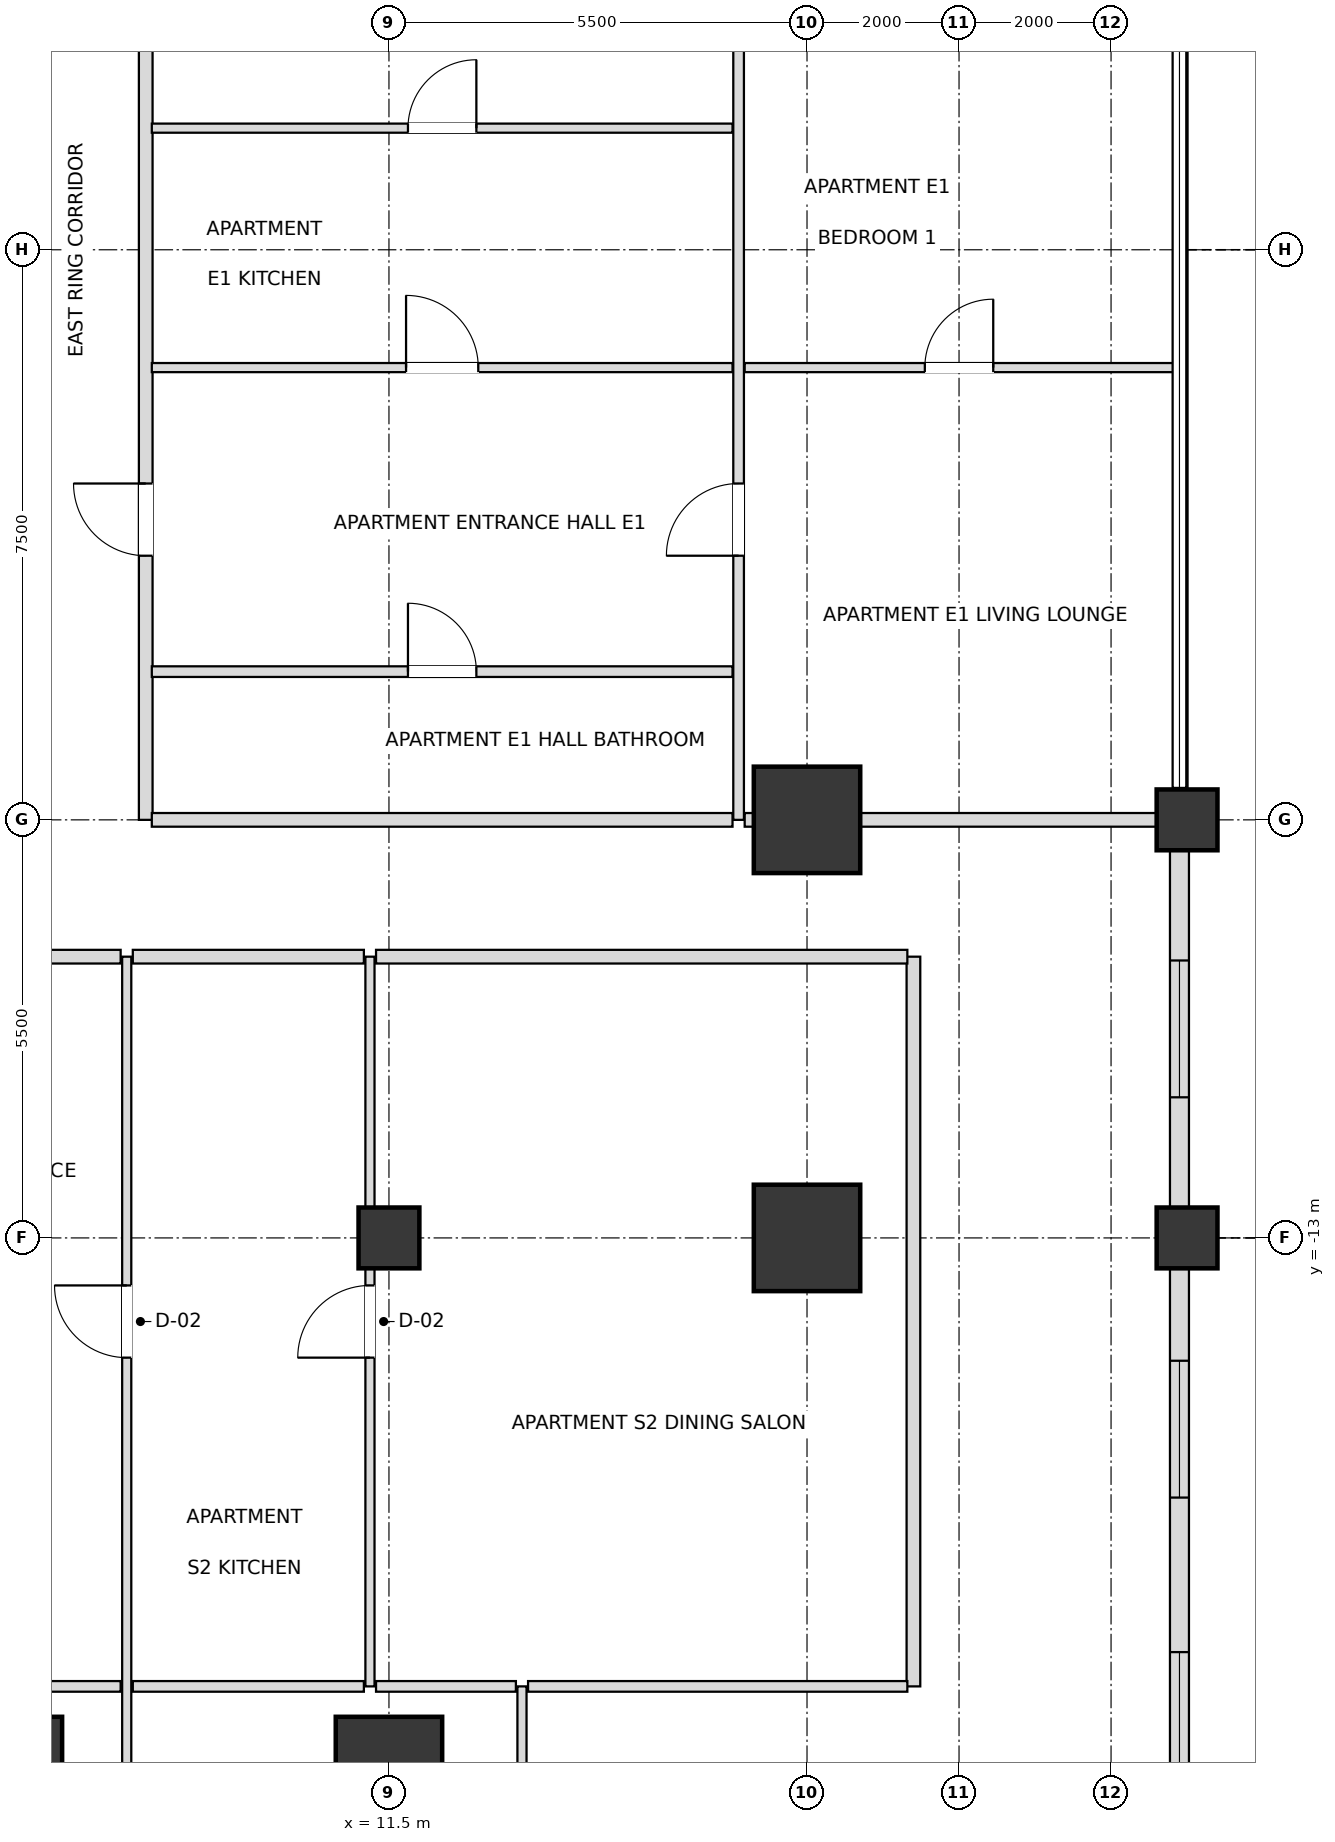
"""IFC4 building model, lengths in metres.
Left out: names, types, materials, properties, quantities, classifications, styles, units other than length and angle.
Written with IfcOpenShell. Run it as: python <this file> out.ifc"""

import sys

from ifc_helpers import new_model, si_unit, direction, frame, frame_2d, origin, origin_2d, place, context, subcontext, project, spatial, rectangle, extrude, element, fill, save


model = new_model("IFC4")
c1 = context("Model", 3, precision=1e-05, world=origin(), true_north=direction((0.0, 1.0)))
c2 = subcontext(c1, "Body", "Model", "MODEL_VIEW")
j1 = project(units=[si_unit("LENGTHUNIT", "METRE"), si_unit("PLANEANGLEUNIT", "RADIAN")], contexts=[c1])
p1 = place(None, origin())
s1 = spatial("IfcSite", under=j1, at=p1, CompositionType="ELEMENT")
p2 = place(p1, origin())
s2 = spatial("IfcBuilding", under=s1, at=p2, CompositionType="ELEMENT")
p3 = place(p2, frame((0.0, 0.0, 50.4)))
s3 = spatial("IfcBuildingStorey", under=s2, at=p3, CompositionType="ELEMENT", Elevation=50.4)
for number, where, z_axis, x_axis in (
    (1, (6.5, -20.0, 0.0), (0.0, 0.0, 1.0), (1.0, 0.0, 0.0)),
    (2, (11.5, -20.0, 0.0), (0.0, 0.0, 1.0), (1.0, 0.0, 0.0)),
    (3, (17.0, -13.0, 0.0), (0.0, 0.0, 1.0), (1.0, 0.0, 0.0)),
    (4, (17.0, -7.5, 0.0), (0.0, 0.0, 1.0), (1.0, 0.0, 0.0)),
):
    element("IfcColumn", number, at=place(p3, frame(where, z_axis=z_axis, x_axis=x_axis)), inside=s3, PredefinedType="USERDEFINED", context=c2, shape_type="SweptSolid", body=[
        extrude(rectangle(XDim=1.4, YDim=1.4, at=origin_2d()), origin(), (0.0, 0.0, 1.0), 3.6),
    ])
for number, where, z_axis, x_axis in (
    (5, (11.5, -13.0, 0.0), (0.0, 0.0, 1.0), (1.0, 0.0, 0.0)),
    (6, (22.0, -13.0, 0.0), (0.0, 0.0, 1.0), (1.0, 0.0, 0.0)),
    (7, (22.0, -7.5, 0.0), (0.0, 0.0, 1.0), (1.0, 0.0, 0.0)),
):
    element("IfcColumn", number, at=place(p3, frame(where, z_axis=z_axis, x_axis=x_axis)), inside=s3, PredefinedType="COLUMN", context=c2, shape_type="SweptSolid", body=[
        extrude(rectangle(XDim=0.8, YDim=0.8, at=origin_2d()), origin(), (0.0, 0.0, 1.0), 3.6),
    ])
p4 = place(p3, frame((21.9, -21.425, 0.0), z_axis=(0.0, 0.0, 1.0), x_axis=(0.0, 1.0, 0.0)))
e8 = element("IfcWall", 8, at=p4, inside=s3, PredefinedType="SOLIDWALL", context=c2, shape_type="SweptSolid", body=[
    extrude(rectangle(XDim=8.03, YDim=0.25, at=frame_2d((4.015, 0.0))), origin(), (0.0, 0.0, 1.0), 2.736),
])
p5 = place(p4, frame((1.176, 0.0, 0.72)))
e9 = element("IfcOpeningElement", 9, at=p5, cuts=e8, PredefinedType="OPENING", context=c2, shape_type="SweptSolid", body=[
    extrude(rectangle(XDim=1.8, YDim=1.68, at=frame_2d((0.9, 0.84))), frame((0.0, 0.135, 0.0), z_axis=(0.0, -1.0, 0.0), x_axis=(1.0, 0.0, 0.0)), (0.0, 0.0, 1.0), 0.27),
])
p6 = place(p4, frame((5.009, 0.0, 0.72)))
e10 = element("IfcOpeningElement", 10, at=p6, cuts=e8, PredefinedType="OPENING", context=c2, shape_type="SweptSolid", body=[
    extrude(rectangle(XDim=1.8, YDim=1.68, at=frame_2d((0.9, 0.84))), frame((0.0, 0.135, 0.0), z_axis=(0.0, -1.0, 0.0), x_axis=(1.0, 0.0, 0.0)), (0.0, 0.0, 1.0), 0.27),
])
p7 = place(p3, frame((21.9, -12.605, 0.0), z_axis=(0.0, 0.0, 1.0), x_axis=(0.0, 1.0, 0.0)))
e11 = element("IfcWall", 11, at=p7, inside=s3, PredefinedType="SOLIDWALL", context=c2, shape_type="SweptSolid", body=[
    extrude(rectangle(XDim=4.71, YDim=0.25, at=frame_2d((2.355, 0.0))), origin(), (0.0, 0.0, 1.0), 2.736),
])
p8 = place(p7, frame((1.455, 0.0, 0.72)))
e12 = element("IfcOpeningElement", 12, at=p8, cuts=e11, PredefinedType="OPENING", context=c2, shape_type="SweptSolid", body=[
    extrude(rectangle(XDim=1.8, YDim=1.68, at=frame_2d((0.9, 0.84))), frame((0.0, 0.135, 0.0), z_axis=(0.0, -1.0, 0.0), x_axis=(1.0, 0.0, 0.0)), (0.0, 0.0, 1.0), 0.27),
])
p9 = place(p3, frame((8.05, -24.9, 0.0), z_axis=(0.0, 0.0, 1.0), x_axis=(0.0, 1.0, 0.0)))
e13 = element("IfcWall", 13, at=p9, inside=s3, PredefinedType="PARTITIONING", context=c2, shape_type="SweptSolid", body=[
    extrude(rectangle(XDim=15.6, YDim=0.12, at=frame_2d((7.8, 0.0))), origin(), (0.0, 0.0, 1.0), 2.816),
])
p10 = place(p9, frame((10.325, 0.0, 0.0)))
e14 = element("IfcOpeningElement", 14, at=p10, cuts=e13, PredefinedType="OPENING", context=c2, shape_type="SweptSolid", body=[
    extrude(rectangle(XDim=0.95, YDim=2.1, at=frame_2d((0.475, 1.05))), frame((0.0, 0.07, 0.0), z_axis=(0.0, -1.0, 0.0), x_axis=(1.0, 0.0, 0.0)), (0.0, 0.0, 1.0), 0.14),
])
p11 = place(p9, frame((2.55, 0.0, 0.0)))
e15 = element("IfcOpeningElement", 15, at=p11, cuts=e13, PredefinedType="OPENING", context=c2, shape_type="SweptSolid", body=[
    extrude(rectangle(XDim=0.9, YDim=2.1, at=frame_2d((0.45, 1.05))), frame((0.0, 0.07, 0.0), z_axis=(0.0, -1.0, 0.0), x_axis=(1.0, 0.0, 0.0)), (0.0, 0.0, 1.0), 0.14),
])
p12 = place(p3, frame((8.3, -7.5, 0.0), z_axis=(0.0, 0.0, 1.0), x_axis=(0.0, 1.0, 0.0)))
e16 = element("IfcWall", 16, at=p12, inside=s3, PredefinedType="PARTITIONING", context=c2, shape_type="SweptSolid", body=[
    extrude(rectangle(XDim=15.0, YDim=0.18, at=frame_2d((7.5, 0.0))), origin(), (0.0, 0.0, 1.0), 3.38),
])
p13 = place(p12, frame((3.475, 0.0, 0.0)))
e17 = element("IfcOpeningElement", 17, at=p13, cuts=e16, PredefinedType="OPENING", context=c2, shape_type="SweptSolid", body=[
    extrude(rectangle(XDim=0.95, YDim=2.15, at=frame_2d((0.475, 1.075))), frame((0.0, 0.1, 0.0), z_axis=(0.0, -1.0, 0.0), x_axis=(1.0, 0.0, 0.0)), (0.0, 0.0, 1.0), 0.2),
])
p14 = place(p3, frame((11.25, -18.9, 0.0), z_axis=(0.0, 0.0, 1.0), x_axis=(0.0, 1.0, 0.0)))
e18 = element("IfcWall", 18, at=p14, inside=s3, PredefinedType="PARTITIONING", context=c2, shape_type="SweptSolid", body=[
    extrude(rectangle(XDim=9.6, YDim=0.12, at=frame_2d((4.8, 0.0))), origin(), (0.0, 0.0, 1.0), 2.736),
])
p15 = place(p14, frame((4.325, 0.0, 0.0)))
e19 = element("IfcOpeningElement", 19, at=p15, cuts=e18, PredefinedType="OPENING", context=c2, shape_type="SweptSolid", body=[
    extrude(rectangle(XDim=0.95, YDim=2.1, at=frame_2d((0.475, 1.05))), frame((0.0, 0.07, 0.0), z_axis=(0.0, -1.0, 0.0), x_axis=(1.0, 0.0, 0.0)), (0.0, 0.0, 1.0), 0.14),
])
p16 = place(p3, frame((13.25, -24.9, 0.0), z_axis=(0.0, 0.0, 1.0), x_axis=(0.0, 1.0, 0.0)))
e20 = element("IfcWall", 20, at=p16, inside=s3, PredefinedType="PARTITIONING", context=c2, shape_type="SweptSolid", body=[
    extrude(rectangle(XDim=6.0, YDim=0.12, at=frame_2d((3.0, 0.0))), origin(), (0.0, 0.0, 1.0), 2.736),
])
p17 = place(p16, frame((2.55, 0.0, 0.0)))
e21 = element("IfcOpeningElement", 21, at=p17, cuts=e20, PredefinedType="OPENING", context=c2, shape_type="SweptSolid", body=[
    extrude(rectangle(XDim=0.9, YDim=2.1, at=frame_2d((0.45, 1.05))), frame((0.0, 0.07, 0.0), z_axis=(0.0, -1.0, 0.0), x_axis=(1.0, 0.0, 0.0)), (0.0, 0.0, 1.0), 0.14),
])
p18 = place(p3, frame((16.1, -7.5, 0.0), z_axis=(0.0, 0.0, 1.0), x_axis=(0.0, 1.0, 0.0)))
e22 = element("IfcWall", 22, at=p18, inside=s3, PredefinedType="PARTITIONING", context=c2, shape_type="SweptSolid", body=[
    extrude(rectangle(XDim=15.0, YDim=0.14, at=frame_2d((7.5, 0.0))), origin(), (0.0, 0.0, 1.0), 3.38),
])
p19 = place(p18, frame((3.475, 0.0, 0.0)))
e23 = element("IfcOpeningElement", 23, at=p19, cuts=e22, PredefinedType="OPENING", context=c2, shape_type="SweptSolid", body=[
    extrude(rectangle(XDim=0.95, YDim=2.1, at=frame_2d((0.475, 1.05))), frame((0.0, 0.08, 0.0), z_axis=(0.0, -1.0, 0.0), x_axis=(1.0, 0.0, 0.0)), (0.0, 0.0, 1.0), 0.16),
])
p20 = place(p3, frame((18.4, -18.9, 0.0), z_axis=(0.0, 0.0, 1.0), x_axis=(0.0, 1.0, 0.0)))
e24 = element("IfcWall", 24, at=p20, inside=s3, PredefinedType="PARTITIONING", context=c2, shape_type="SweptSolid", body=[
    extrude(rectangle(XDim=9.6, YDim=0.18, at=frame_2d((4.8, 0.0))), origin(), (0.0, 0.0, 1.0), 2.736),
])
p21 = place(p3, frame((3.93, -18.9, 0.0), z_axis=(0.0, 0.0, 1.0), x_axis=(1.0, 0.0, 0.0)))
e25 = element("IfcWall", 25, at=p21, inside=s3, PredefinedType="PARTITIONING", context=c2, shape_type="SweptSolid", body=[
    extrude(rectangle(XDim=4.04, YDim=0.14, at=frame_2d((2.02, 0.0))), origin(), (0.0, 0.0, 1.0), 2.816),
])
p22 = place(p21, frame((0.638, 0.0, 0.0)))
e26 = element("IfcOpeningElement", 26, at=p22, cuts=e25, PredefinedType="OPENING", context=c2, shape_type="SweptSolid", body=[
    extrude(rectangle(XDim=0.95, YDim=2.1, at=frame_2d((0.475, 1.05))), frame((0.0, 0.08, 0.0), z_axis=(0.0, -1.0, 0.0), x_axis=(1.0, 0.0, 0.0)), (0.0, 0.0, 1.0), 0.16),
])
p23 = place(p3, frame((8.13, -18.9, 0.0), z_axis=(0.0, 0.0, 1.0), x_axis=(1.0, 0.0, 0.0)))
e27 = element("IfcWall", 27, at=p23, inside=s3, PredefinedType="PARTITIONING", context=c2, shape_type="SweptSolid", body=[
    extrude(rectangle(XDim=3.04, YDim=0.14, at=frame_2d((1.52, 0.0))), origin(), (0.0, 0.0, 1.0), 3.38),
])
p24 = place(p3, frame((11.33, -18.9, 0.0), z_axis=(0.0, 0.0, 1.0), x_axis=(1.0, 0.0, 0.0)))
e28 = element("IfcWall", 28, at=p24, inside=s3, PredefinedType="PARTITIONING", context=c2, shape_type="SweptSolid", body=[
    extrude(rectangle(XDim=1.84, YDim=0.14, at=frame_2d((0.92, 0.0))), origin(), (0.0, 0.0, 1.0), 2.736),
])
p25 = place(p3, frame((13.33, -18.9, 0.0), z_axis=(0.0, 0.0, 1.0), x_axis=(1.0, 0.0, 0.0)))
e29 = element("IfcWall", 29, at=p25, inside=s3, PredefinedType="PARTITIONING", context=c2, shape_type="SweptSolid", body=[
    extrude(rectangle(XDim=4.99, YDim=0.14, at=frame_2d((2.495, 0.0))), origin(), (0.0, 0.0, 1.0), 2.736),
])
p26 = place(p3, frame((3.93, -9.3, 0.0), z_axis=(0.0, 0.0, 1.0), x_axis=(1.0, 0.0, 0.0)))
e30 = element("IfcWall", 30, at=p26, inside=s3, PredefinedType="PARTITIONING", context=c2, shape_type="SweptSolid", body=[
    extrude(rectangle(XDim=4.04, YDim=0.18, at=frame_2d((2.02, 0.0))), origin(), (0.0, 0.0, 1.0), 2.816),
])
p27 = place(p26, frame((1.565, 0.0, 0.0)))
e31 = element("IfcOpeningElement", 31, at=p27, cuts=e30, PredefinedType="OPENING", context=c2, shape_type="SweptSolid", body=[
    extrude(rectangle(XDim=0.95, YDim=2.15, at=frame_2d((0.475, 1.075))), frame((0.0, 0.1, 0.0), z_axis=(0.0, -1.0, 0.0), x_axis=(1.0, 0.0, 0.0)), (0.0, 0.0, 1.0), 0.2),
])
p28 = place(p3, frame((8.13, -9.3, 0.0), z_axis=(0.0, 0.0, 1.0), x_axis=(1.0, 0.0, 0.0)))
e32 = element("IfcWall", 32, at=p28, inside=s3, PredefinedType="PARTITIONING", context=c2, shape_type="SweptSolid", body=[
    extrude(rectangle(XDim=3.04, YDim=0.18, at=frame_2d((1.52, 0.0))), origin(), (0.0, 0.0, 1.0), 3.38),
])
p29 = place(p3, frame((11.33, -9.3, 0.0), z_axis=(0.0, 0.0, 1.0), x_axis=(1.0, 0.0, 0.0)))
e33 = element("IfcWall", 33, at=p29, inside=s3, PredefinedType="PARTITIONING", context=c2, shape_type="SweptSolid", body=[
    extrude(rectangle(XDim=6.99, YDim=0.18, at=frame_2d((3.495, 0.0))), origin(), (0.0, 0.0, 1.0), 2.816),
])
p30 = place(p3, frame((8.38, -7.5, 0.0), z_axis=(0.0, 0.0, 1.0), x_axis=(1.0, 0.0, 0.0)))
e34 = element("IfcWall", 34, at=p30, inside=s3, PredefinedType="PARTITIONING", context=c2, shape_type="SweptSolid", body=[
    extrude(rectangle(XDim=7.64, YDim=0.18, at=frame_2d((3.82, 0.0))), origin(), (0.0, 0.0, 1.0), 2.816),
])
p31 = place(p3, frame((16.18, -7.5, 0.0), z_axis=(0.0, 0.0, 1.0), x_axis=(1.0, 0.0, 0.0)))
e35 = element("IfcWall", 35, at=p31, inside=s3, PredefinedType="PARTITIONING", context=c2, shape_type="SweptSolid", body=[
    extrude(rectangle(XDim=5.72, YDim=0.18, at=frame_2d((2.86, 0.0))), origin(), (0.0, 0.0, 1.0), 2.816),
])
p32 = place(p3, frame((8.38, -5.55, 0.0), z_axis=(0.0, 0.0, 1.0), x_axis=(1.0, 0.0, 0.0)))
e36 = element("IfcWall", 36, at=p32, inside=s3, PredefinedType="PARTITIONING", context=c2, shape_type="SweptSolid", body=[
    extrude(rectangle(XDim=7.64, YDim=0.14, at=frame_2d((3.82, 0.0))), origin(), (0.0, 0.0, 1.0), 2.948),
])
p33 = place(p32, frame((3.37, 0.0, 0.0)))
e37 = element("IfcOpeningElement", 37, at=p33, cuts=e36, PredefinedType="OPENING", context=c2, shape_type="SweptSolid", body=[
    extrude(rectangle(XDim=0.9, YDim=2.1, at=frame_2d((0.45, 1.05))), frame((0.0, 0.08, 0.0), z_axis=(0.0, -1.0, 0.0), x_axis=(1.0, 0.0, 0.0)), (0.0, 0.0, 1.0), 0.16),
])
p34 = place(p3, frame((8.38, -1.55, 0.0), z_axis=(0.0, 0.0, 1.0), x_axis=(1.0, 0.0, 0.0)))
e38 = element("IfcWall", 38, at=p34, inside=s3, PredefinedType="PARTITIONING", context=c2, shape_type="SweptSolid", body=[
    extrude(rectangle(XDim=7.64, YDim=0.12, at=frame_2d((3.82, 0.0))), origin(), (0.0, 0.0, 1.0), 2.948),
])
p35 = place(p34, frame((3.345, 0.0, 0.0)))
e39 = element("IfcOpeningElement", 39, at=p35, cuts=e38, PredefinedType="OPENING", context=c2, shape_type="SweptSolid", body=[
    extrude(rectangle(XDim=0.95, YDim=2.1, at=frame_2d((0.475, 1.05))), frame((0.0, 0.07, 0.0), z_axis=(0.0, -1.0, 0.0), x_axis=(1.0, 0.0, 0.0)), (0.0, 0.0, 1.0), 0.14),
])
p36 = place(p3, frame((16.18, -1.55, 0.0), z_axis=(0.0, 0.0, 1.0), x_axis=(1.0, 0.0, 0.0)))
e40 = element("IfcWall", 40, at=p36, inside=s3, PredefinedType="PARTITIONING", context=c2, shape_type="SweptSolid", body=[
    extrude(rectangle(XDim=5.64, YDim=0.12, at=frame_2d((2.82, 0.0))), origin(), (0.0, 0.0, 1.0), 2.816),
])
p37 = place(p36, frame((2.37, 0.0, 0.0)))
e41 = element("IfcOpeningElement", 41, at=p37, cuts=e40, PredefinedType="OPENING", context=c2, shape_type="SweptSolid", body=[
    extrude(rectangle(XDim=0.9, YDim=2.1, at=frame_2d((0.45, 1.05))), frame((0.0, 0.07, 0.0), z_axis=(0.0, -1.0, 0.0), x_axis=(1.0, 0.0, 0.0)), (0.0, 0.0, 1.0), 0.14),
])
p38 = place(p3, frame((8.38, 1.6, 0.0), z_axis=(0.0, 0.0, 1.0), x_axis=(1.0, 0.0, 0.0)))
e42 = element("IfcWall", 42, at=p38, inside=s3, PredefinedType="PARTITIONING", context=c2, shape_type="SweptSolid", body=[
    extrude(rectangle(XDim=7.64, YDim=0.12, at=frame_2d((3.82, 0.0))), origin(), (0.0, 0.0, 1.0), 2.948),
])
p39 = place(p38, frame((3.37, 0.0, 0.0)))
e43 = element("IfcOpeningElement", 43, at=p39, cuts=e42, PredefinedType="OPENING", context=c2, shape_type="SweptSolid", body=[
    extrude(rectangle(XDim=0.9, YDim=2.1, at=frame_2d((0.45, 1.05))), frame((0.0, 0.07, 0.0), z_axis=(0.0, -1.0, 0.0), x_axis=(1.0, 0.0, 0.0)), (0.0, 0.0, 1.0), 0.14),
])
p40 = place(p5, origin())
e44 = element("IfcWindow", 44, at=p40, inside=s3, PartitioningType="SINGLE_PANEL", PredefinedType="WINDOW", context=c2, shape_type="SweptSolid", body=[
    extrude(rectangle(XDim=1.8, YDim=1.68, at=frame_2d((0.9, 0.84))), frame((0.0, 0.03, 0.0), z_axis=(0.0, -1.0, 0.0), x_axis=(1.0, 0.0, 0.0)), (0.0, 0.0, 1.0), 0.06),
])
fill(e9, e44)
p41 = place(p6, origin())
e45 = element("IfcWindow", 45, at=p41, inside=s3, PartitioningType="SINGLE_PANEL", PredefinedType="WINDOW", context=c2, shape_type="SweptSolid", body=[
    extrude(rectangle(XDim=1.8, YDim=1.68, at=frame_2d((0.9, 0.84))), frame((0.0, 0.03, 0.0), z_axis=(0.0, -1.0, 0.0), x_axis=(1.0, 0.0, 0.0)), (0.0, 0.0, 1.0), 0.06),
])
fill(e10, e45)
p42 = place(p8, origin())
e46 = element("IfcWindow", 46, at=p42, inside=s3, PartitioningType="SINGLE_PANEL", PredefinedType="WINDOW", context=c2, shape_type="SweptSolid", body=[
    extrude(rectangle(XDim=1.8, YDim=1.68, at=frame_2d((0.9, 0.84))), frame((0.0, 0.03, 0.0), z_axis=(0.0, -1.0, 0.0), x_axis=(1.0, 0.0, 0.0)), (0.0, 0.0, 1.0), 0.06),
])
fill(e12, e46)
p43 = place(p10, origin())
e47 = element("IfcDoor", 47, at=p43, inside=s3, OperationType="SINGLE_SWING_RIGHT", PredefinedType="DOOR", context=c2, shape_type="SweptSolid", body=[
    extrude(rectangle(XDim=0.95, YDim=2.1, at=frame_2d((0.475, 1.05))), frame((0.0, 0.025, 0.0), z_axis=(0.0, -1.0, 0.0), x_axis=(1.0, 0.0, 0.0)), (0.0, 0.0, 1.0), 0.05),
])
fill(e14, e47)
p44 = place(p15, origin())
e48 = element("IfcDoor", 48, at=p44, inside=s3, OperationType="SINGLE_SWING_LEFT", PredefinedType="DOOR", context=c2, shape_type="SweptSolid", body=[
    extrude(rectangle(XDim=0.95, YDim=2.1, at=frame_2d((0.475, 1.05))), frame((0.0, 0.025, 0.0), z_axis=(0.0, -1.0, 0.0), x_axis=(1.0, 0.0, 0.0)), (0.0, 0.0, 1.0), 0.05),
])
fill(e19, e48)
p45 = place(p33, origin())
e49 = element("IfcDoor", 49, at=p45, inside=s3, OperationType="SINGLE_SWING_LEFT", PredefinedType="DOOR", context=c2, shape_type="SweptSolid", body=[
    extrude(rectangle(XDim=0.9, YDim=2.1, at=frame_2d((0.45, 1.05))), frame((0.0, 0.025, 0.0), z_axis=(0.0, -1.0, 0.0), x_axis=(1.0, 0.0, 0.0)), (0.0, 0.0, 1.0), 0.05),
])
fill(e37, e49)
p46 = place(p13, origin())
e50 = element("IfcDoor", 50, at=p46, inside=s3, OperationType="SINGLE_SWING_RIGHT", PredefinedType="DOOR", context=c2, shape_type="SweptSolid", body=[
    extrude(rectangle(XDim=0.95, YDim=2.15, at=frame_2d((0.475, 1.075))), frame((0.0, 0.025, 0.0), z_axis=(0.0, -1.0, 0.0), x_axis=(1.0, 0.0, 0.0)), (0.0, 0.0, 1.0), 0.05),
])
fill(e17, e50)
p47 = place(p35, origin())
e51 = element("IfcDoor", 51, at=p47, inside=s3, OperationType="SINGLE_SWING_LEFT", PredefinedType="DOOR", context=c2, shape_type="SweptSolid", body=[
    extrude(rectangle(XDim=0.95, YDim=2.1, at=frame_2d((0.475, 1.05))), frame((0.0, 0.025, 0.0), z_axis=(0.0, -1.0, 0.0), x_axis=(1.0, 0.0, 0.0)), (0.0, 0.0, 1.0), 0.05),
])
fill(e39, e51)
p48 = place(p39, origin())
e52 = element("IfcDoor", 52, at=p48, inside=s3, OperationType="SINGLE_SWING_RIGHT", PredefinedType="DOOR", context=c2, shape_type="SweptSolid", body=[
    extrude(rectangle(XDim=0.9, YDim=2.1, at=frame_2d((0.45, 1.05))), frame((0.0, 0.025, 0.0), z_axis=(0.0, -1.0, 0.0), x_axis=(1.0, 0.0, 0.0)), (0.0, 0.0, 1.0), 0.05),
])
fill(e43, e52)
p49 = place(p19, origin())
e53 = element("IfcDoor", 53, at=p49, inside=s3, OperationType="SINGLE_SWING_LEFT", PredefinedType="DOOR", context=c2, shape_type="SweptSolid", body=[
    extrude(rectangle(XDim=0.95, YDim=2.1, at=frame_2d((0.475, 1.05))), frame((0.0, 0.025, 0.0), z_axis=(0.0, -1.0, 0.0), x_axis=(1.0, 0.0, 0.0)), (0.0, 0.0, 1.0), 0.05),
])
fill(e23, e53)
p50 = place(p37, origin())
e54 = element("IfcDoor", 54, at=p50, inside=s3, OperationType="SINGLE_SWING_RIGHT", PredefinedType="DOOR", context=c2, shape_type="SweptSolid", body=[
    extrude(rectangle(XDim=0.9, YDim=2.1, at=frame_2d((0.45, 1.05))), frame((0.0, 0.025, 0.0), z_axis=(0.0, -1.0, 0.0), x_axis=(1.0, 0.0, 0.0)), (0.0, 0.0, 1.0), 0.05),
])
fill(e41, e54)
save(model, sys.argv[1])
